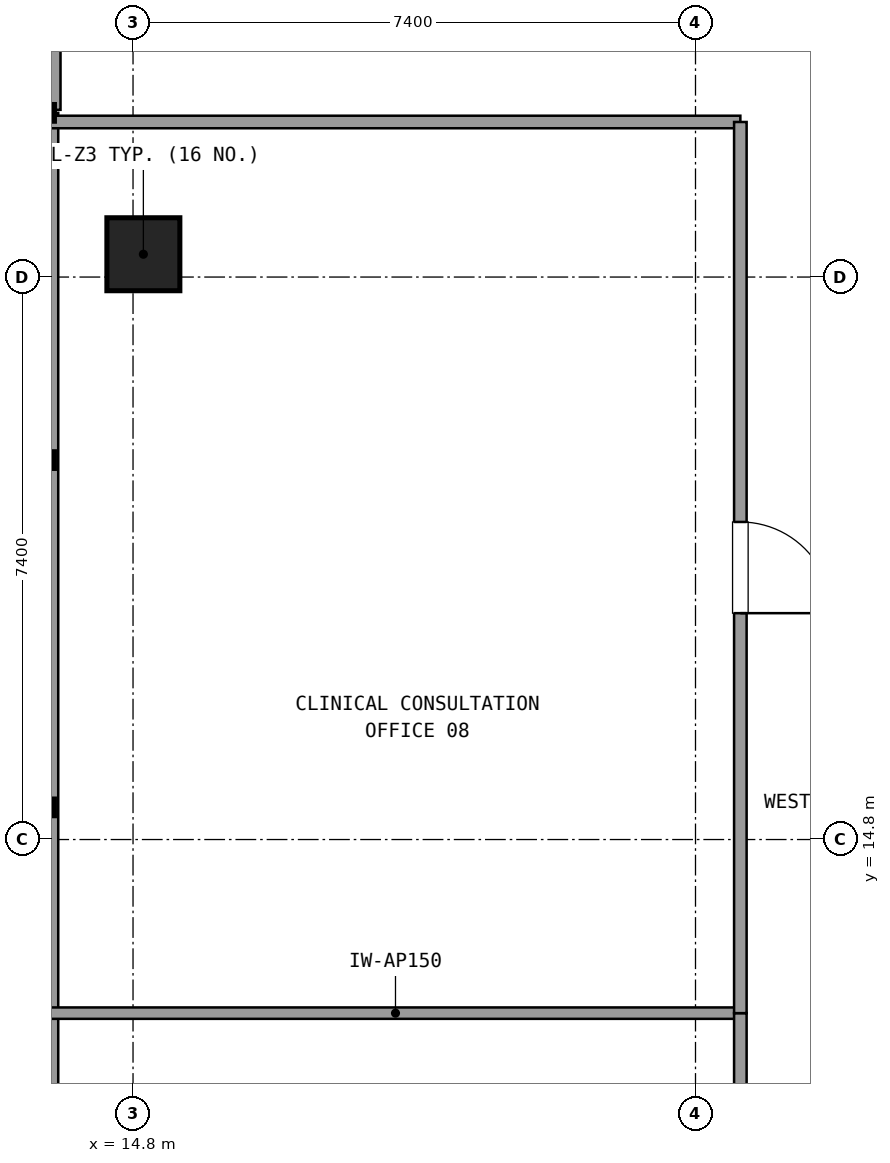
"""IFC4 building model, lengths in metres.
Left out: names, types, materials, properties, quantities, classifications, styles, units other than length and angle.
Written with IfcOpenShell. Run it as: python <this file> out.ifc"""

import sys

from ifc_helpers import new_model, si_unit, direction, frame, frame_2d, origin, origin_2d, place, context, subcontext, project, spatial, rectangle, extrude, element, fill, save


model = new_model("IFC4")
c1 = context("Model", 3, precision=1e-05, world=origin(), true_north=direction((0.0, 1.0)))
c2 = subcontext(c1, "Body", "Model", "MODEL_VIEW")
j1 = project(units=[si_unit("LENGTHUNIT", "METRE"), si_unit("PLANEANGLEUNIT", "RADIAN")], contexts=[c1])
p1 = place(None, origin())
s1 = spatial("IfcSite", under=j1, at=p1, CompositionType="ELEMENT")
p2 = place(p1, origin())
s2 = spatial("IfcBuilding", under=s1, at=p2, CompositionType="ELEMENT")
p3 = place(p2, frame((0.0, 0.0, 170.82)))
s3 = spatial("IfcBuildingStorey", under=s2, at=p3, CompositionType="ELEMENT", Elevation=170.82)
p4 = place(p3, frame((14.936, 22.5, 0.0), z_axis=(0.0, 0.0, 1.0), x_axis=(1.0, 0.0, 0.0)))
e1 = element("IfcColumn", 1, at=p4, inside=s3, PredefinedType="COLUMN", context=c2, shape_type="SweptSolid", body=[
    extrude(rectangle(XDim=0.96, YDim=0.96, at=origin_2d()), origin(), (0.0, 0.0, 1.0), 3.6),
])
p5 = place(p3, frame((13.696, 27.4, 0.0), z_axis=(0.0, 0.0, 1.0), x_axis=(0.0, -1.0, 0.0)))
e2 = element("IfcWall", 2, at=p5, inside=s3, PredefinedType="SOLIDWALL", context=c2, shape_type="SweptSolid", body=[
    extrude(rectangle(XDim=3.0, YDim=0.3, at=frame_2d((1.5, 0.0))), origin(), (0.0, 0.0, 1.0), 2.67),
])
p6 = place(p5, frame((0.9, 0.0, 0.0)))
e3 = element("IfcOpeningElement", 3, at=p6, cuts=e2, PredefinedType="OPENING", context=c2, shape_type="SweptSolid", body=[
    extrude(rectangle(XDim=1.2, YDim=2.2, at=frame_2d((0.6, 1.1))), frame((0.0, 0.16, 0.0), z_axis=(0.0, -1.0, 0.0), x_axis=(1.0, 0.0, 0.0)), (0.0, 0.0, 1.0), 0.32),
])
p7 = place(p3, frame((13.696, 24.36, 0.0), z_axis=(0.0, 0.0, 1.0), x_axis=(0.0, -1.0, 0.0)))
e4 = element("IfcWall", 4, at=p7, inside=s3, PredefinedType="SOLIDWALL", context=c2, shape_type="SweptSolid", body=[
    extrude(rectangle(XDim=13.705, YDim=0.24, at=frame_2d((6.853, 0.0))), origin(), (0.0, 0.0, 1.0), 0.85),
])
p8 = place(p3, frame((13.716, 24.24, 0.0), z_axis=(0.0, 0.0, 1.0), x_axis=(1.0, 0.0, 0.0)))
e5 = element("IfcWall", 5, at=p8, inside=s3, PredefinedType="PARTITIONING", context=c2, shape_type="SweptSolid", body=[
    extrude(rectangle(XDim=9.074, YDim=0.165, at=frame_2d((4.537, 0.0))), origin(), (0.0, 0.0, 1.0), 2.61),
])
p9 = place(p3, frame((22.79, 12.516, 0.0), z_axis=(0.0, 0.0, 1.0), x_axis=(-1.0, 0.0, 0.0)))
e6 = element("IfcWall", 6, at=p9, inside=s3, PredefinedType="PARTITIONING", context=c2, shape_type="SweptSolid", body=[
    extrude(rectangle(XDim=9.074, YDim=0.15, at=frame_2d((4.537, 0.0))), origin(), (0.0, 0.0, 1.0), 2.61),
])
p10 = place(p3, frame((22.79, 4.7, 0.0), z_axis=(0.0, 0.0, 1.0), x_axis=(0.0, 1.0, 0.0)))
e7 = element("IfcWall", 7, at=p10, inside=s3, PredefinedType="PARTITIONING", context=c2, shape_type="SweptSolid", body=[
    extrude(rectangle(XDim=7.816, YDim=0.165, at=frame_2d((3.908, 0.0))), origin(), (0.0, 0.0, 1.0), 2.61),
])
p11 = place(p10, frame((3.308, 0.0, 0.0)))
e8 = element("IfcOpeningElement", 8, at=p11, cuts=e7, PredefinedType="OPENING", context=c2, shape_type="SweptSolid", body=[
    extrude(rectangle(XDim=1.2, YDim=2.15, at=frame_2d((0.6, 1.075))), frame((0.0, 0.093, 0.0), z_axis=(0.0, -1.0, 0.0), x_axis=(1.0, 0.0, 0.0)), (0.0, 0.0, 1.0), 0.185),
])
p12 = place(p3, frame((22.79, 12.516, 0.0), z_axis=(0.0, 0.0, 1.0), x_axis=(0.0, 1.0, 0.0)))
e9 = element("IfcWall", 9, at=p12, inside=s3, PredefinedType="PARTITIONING", context=c2, shape_type="SweptSolid", body=[
    extrude(rectangle(XDim=11.724, YDim=0.165, at=frame_2d((5.862, 0.0))), origin(), (0.0, 0.0, 1.0), 2.61),
])
p13 = place(p12, frame((5.262, 0.0, 0.0)))
e10 = element("IfcOpeningElement", 10, at=p13, cuts=e9, PredefinedType="OPENING", context=c2, shape_type="SweptSolid", body=[
    extrude(rectangle(XDim=1.2, YDim=2.15, at=frame_2d((0.6, 1.075))), frame((0.0, 0.093, 0.0), z_axis=(0.0, -1.0, 0.0), x_axis=(1.0, 0.0, 0.0)), (0.0, 0.0, 1.0), 0.185),
])
p14 = place(p13, frame((1.2, 0.0, 0.0), z_axis=(0.0, 0.0, 1.0), x_axis=(-1.0, 0.0, 0.0)))
e11 = element("IfcDoor", 11, at=p14, inside=s3, OperationType="SINGLE_SWING_LEFT", PredefinedType="DOOR", context=c2, shape_type="SweptSolid", body=[
    extrude(rectangle(XDim=1.2, YDim=2.15, at=frame_2d((0.6, 1.075))), frame((0.0, 0.025, 0.0), z_axis=(0.0, -1.0, 0.0), x_axis=(1.0, 0.0, 0.0)), (0.0, 0.0, 1.0), 0.05),
])
fill(e10, e11)
save(model, sys.argv[1])
